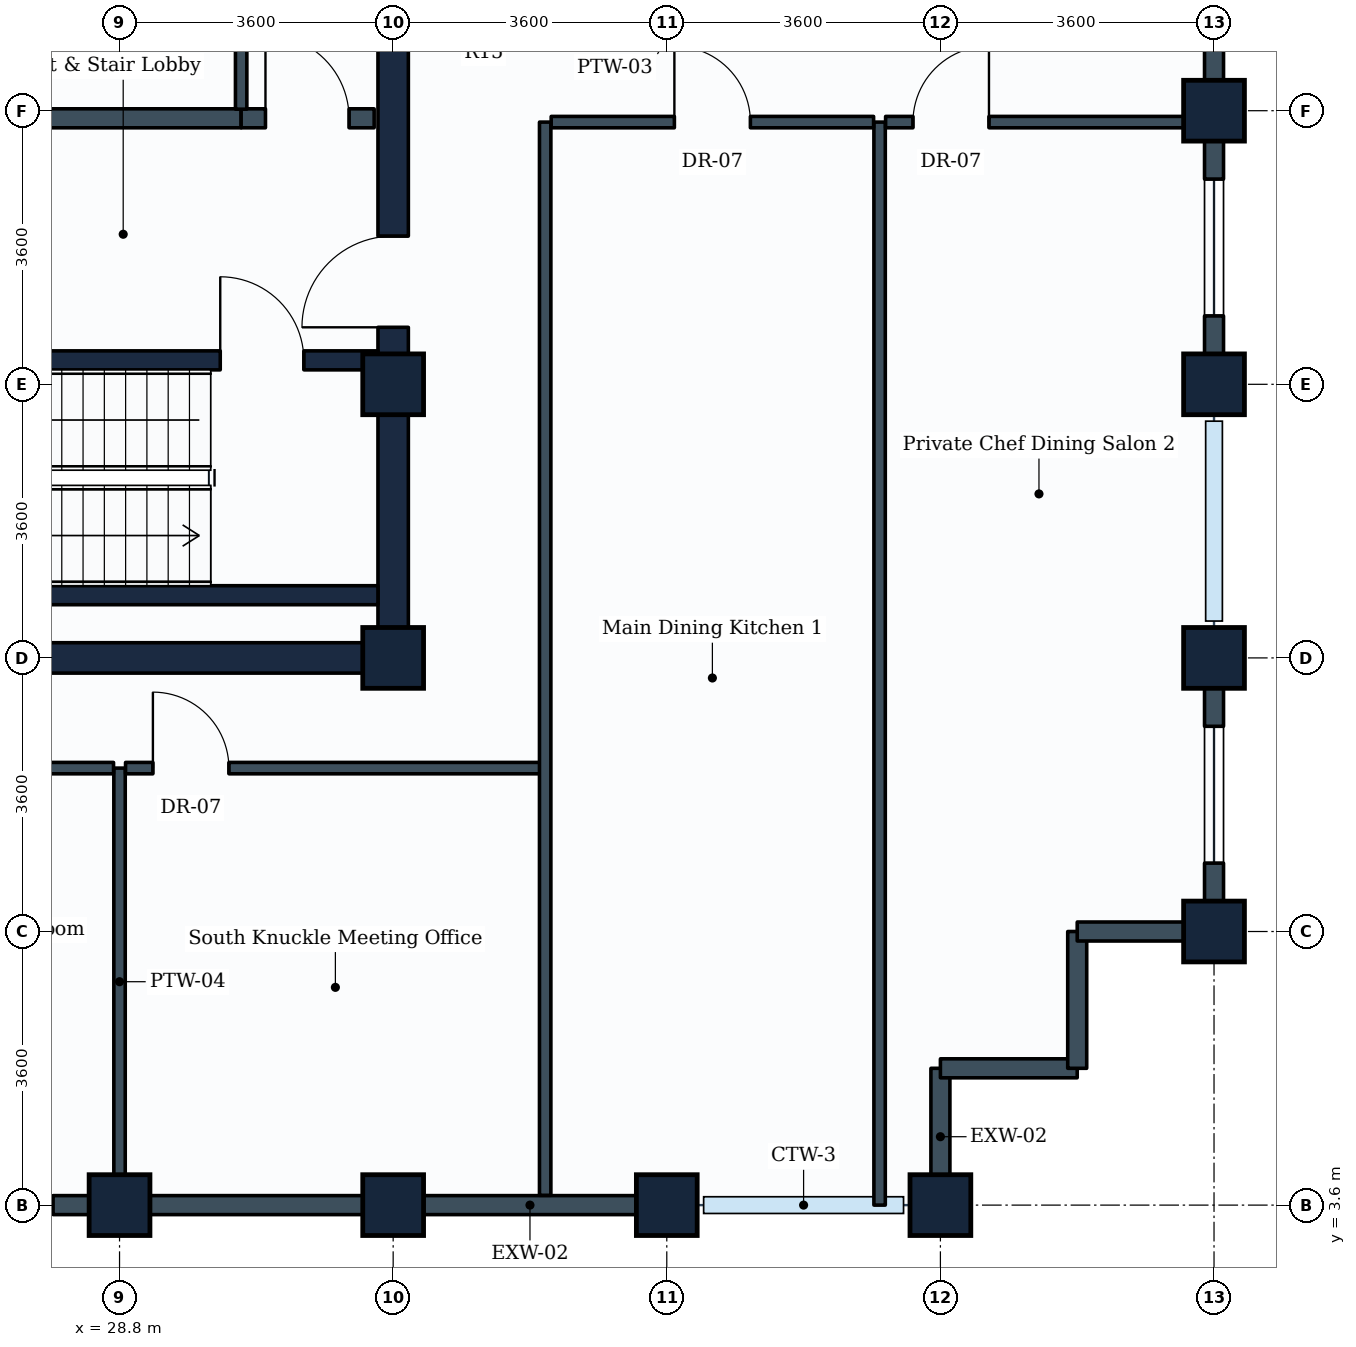
"""IFC4 building model, lengths in metres.
Left out: names, types, materials, properties, quantities, classifications, styles, units other than length and angle.
Written with IfcOpenShell. Run it as: python <this file> out.ifc"""

import sys

from ifc_helpers import new_model, si_unit, direction, frame, frame_2d, origin, origin_2d, place, context, subcontext, project, spatial, rectangle, extrude, element, fill, save


model = new_model("IFC4")
c1 = context("Model", 3, precision=1e-05, world=origin(), true_north=direction((0.0, 1.0)))
c2 = subcontext(c1, "Body", "Model", "MODEL_VIEW")
j1 = project(units=[si_unit("LENGTHUNIT", "METRE"), si_unit("PLANEANGLEUNIT", "RADIAN")], contexts=[c1])
p1 = place(None, origin())
s1 = spatial("IfcSite", under=j1, at=p1, CompositionType="ELEMENT")
p2 = place(p1, origin())
s2 = spatial("IfcBuilding", under=s1, at=p2, CompositionType="ELEMENT")
p3 = place(p2, frame((0.0, 0.0, 295.4)))
s3 = spatial("IfcBuildingStorey", under=s2, at=p3, CompositionType="ELEMENT", Elevation=295.4)
for number, where, z_axis, x_axis in (
    (1, (28.8, 3.6, 0.0), (0.0, 0.0, 1.0), (1.0, 0.0, 0.0)),
    (2, (32.4, 3.6, 0.0), (0.0, 0.0, 1.0), (1.0, 0.0, 0.0)),
    (3, (32.4, 10.8, 0.0), (0.0, 0.0, 1.0), (1.0, 0.0, 0.0)),
    (4, (32.4, 14.4, 0.0), (0.0, 0.0, 1.0), (1.0, 0.0, 0.0)),
    (5, (36.0, 3.6, 0.0), (0.0, 0.0, 1.0), (1.0, 0.0, 0.0)),
    (6, (39.6, 3.6, 0.0), (0.0, 0.0, 1.0), (1.0, 0.0, 0.0)),
    (7, (43.2, 7.2, 0.0), (0.0, 0.0, 1.0), (1.0, 0.0, 0.0)),
    (8, (43.2, 10.8, 0.0), (0.0, 0.0, 1.0), (0.0, 1.0, 0.0)),
    (9, (43.2, 14.4, 0.0), (0.0, 0.0, 1.0), (0.0, 1.0, 0.0)),
    (10, (43.2, 18.0, 0.0), (0.0, 0.0, 1.0), (0.0, 1.0, 0.0)),
):
    element("IfcColumn", number, at=place(p3, frame(where, z_axis=z_axis, x_axis=x_axis)), inside=s3, PredefinedType="COLUMN", context=c2, shape_type="SweptSolid", body=[
        extrude(rectangle(XDim=0.8, YDim=0.8, at=origin_2d()), origin(), (0.0, 0.0, 1.0), 4.4),
    ])
p4 = place(p3, frame((28.8, 3.6, 0.0), z_axis=(0.0, 0.0, 1.0), x_axis=(-1.0, 0.0, 0.0)))
e11 = element("IfcWall", 11, at=p4, inside=s3, PredefinedType="STANDARD", context=c2, shape_type="SweptSolid", body=[
    extrude(rectangle(XDim=3.6, YDim=0.25, at=frame_2d((1.8, 0.0))), origin(), (0.0, 0.0, 1.0), 3.63),
])
p5 = place(p4, frame((0.875, 0.0, 0.85)))
e12 = element("IfcOpeningElement", 12, at=p5, cuts=e11, PredefinedType="OPENING", context=c2, shape_type="SweptSolid", body=[
    extrude(rectangle(XDim=1.8, YDim=1.35, at=frame_2d((0.9, 0.675))), frame((0.0, 0.135, 0.0), z_axis=(0.0, -1.0, 0.0), x_axis=(1.0, 0.0, 0.0)), (0.0, 0.0, 1.0), 0.27),
])
p6 = place(p3, frame((32.4, 3.6, 0.0), z_axis=(0.0, 0.0, 1.0), x_axis=(-1.0, 0.0, 0.0)))
e13 = element("IfcWall", 13, at=p6, inside=s3, PredefinedType="STANDARD", context=c2, shape_type="SweptSolid", body=[
    extrude(rectangle(XDim=3.6, YDim=0.25, at=frame_2d((1.8, 0.0))), origin(), (0.0, 0.0, 1.0), 3.63),
])
p7 = place(p3, frame((36.0, 3.6, 0.0), z_axis=(0.0, 0.0, 1.0), x_axis=(-1.0, 0.0, 0.0)))
e14 = element("IfcWall", 14, at=p7, inside=s3, PredefinedType="STANDARD", context=c2, shape_type="SweptSolid", body=[
    extrude(rectangle(XDim=3.6, YDim=0.25, at=frame_2d((1.8, 0.0))), origin(), (0.0, 0.0, 1.0), 3.63),
])
p8 = place(p3, frame((39.6, 5.4, 0.0), z_axis=(0.0, 0.0, 1.0), x_axis=(0.0, -1.0, 0.0)))
e15 = element("IfcWall", 15, at=p8, inside=s3, PredefinedType="STANDARD", context=c2, shape_type="SweptSolid", body=[
    extrude(rectangle(XDim=1.8, YDim=0.25, at=frame_2d((0.9, 0.0))), origin(), (0.0, 0.0, 1.0), 3.63),
])
p9 = place(p3, frame((41.4, 5.4, 0.0), z_axis=(0.0, 0.0, 1.0), x_axis=(-1.0, 0.0, 0.0)))
e16 = element("IfcWall", 16, at=p9, inside=s3, PredefinedType="STANDARD", context=c2, shape_type="SweptSolid", body=[
    extrude(rectangle(XDim=1.8, YDim=0.25, at=frame_2d((0.9, 0.0))), origin(), (0.0, 0.0, 1.0), 4.135),
])
p10 = place(p3, frame((41.4, 7.2, 0.0), z_axis=(0.0, 0.0, 1.0), x_axis=(0.0, -1.0, 0.0)))
e17 = element("IfcWall", 17, at=p10, inside=s3, PredefinedType="STANDARD", context=c2, shape_type="SweptSolid", body=[
    extrude(rectangle(XDim=1.8, YDim=0.25, at=frame_2d((0.9, 0.0))), origin(), (0.0, 0.0, 1.0), 4.135),
])
p11 = place(p3, frame((43.2, 7.2, 0.0), z_axis=(0.0, 0.0, 1.0), x_axis=(-1.0, 0.0, 0.0)))
e18 = element("IfcWall", 18, at=p11, inside=s3, PredefinedType="STANDARD", context=c2, shape_type="SweptSolid", body=[
    extrude(rectangle(XDim=1.8, YDim=0.25, at=frame_2d((0.9, 0.0))), origin(), (0.0, 0.0, 1.0), 3.63),
])
p12 = place(p3, frame((43.2, 10.8, 0.0), z_axis=(0.0, 0.0, 1.0), x_axis=(0.0, -1.0, 0.0)))
e19 = element("IfcWall", 19, at=p12, inside=s3, PredefinedType="STANDARD", context=c2, shape_type="SweptSolid", body=[
    extrude(rectangle(XDim=3.6, YDim=0.25, at=frame_2d((1.8, 0.0))), origin(), (0.0, 0.0, 1.0), 3.63),
])
p13 = place(p12, frame((0.9, 0.0, 0.85)))
e20 = element("IfcOpeningElement", 20, at=p13, cuts=e19, PredefinedType="OPENING", context=c2, shape_type="SweptSolid", body=[
    extrude(rectangle(XDim=1.8, YDim=1.35, at=frame_2d((0.9, 0.675))), frame((0.0, 0.135, 0.0), z_axis=(0.0, -1.0, 0.0), x_axis=(1.0, 0.0, 0.0)), (0.0, 0.0, 1.0), 0.27),
])
p14 = place(p3, frame((43.2, 18.0, 0.0), z_axis=(0.0, 0.0, 1.0), x_axis=(0.0, -1.0, 0.0)))
e21 = element("IfcWall", 21, at=p14, inside=s3, PredefinedType="STANDARD", context=c2, shape_type="SweptSolid", body=[
    extrude(rectangle(XDim=3.6, YDim=0.25, at=frame_2d((1.8, 0.0))), origin(), (0.0, 0.0, 1.0), 3.63),
])
p15 = place(p14, frame((0.9, 0.0, 0.85)))
e22 = element("IfcOpeningElement", 22, at=p15, cuts=e21, PredefinedType="OPENING", context=c2, shape_type="SweptSolid", body=[
    extrude(rectangle(XDim=1.8, YDim=1.35, at=frame_2d((0.9, 0.675))), frame((0.0, 0.135, 0.0), z_axis=(0.0, -1.0, 0.0), x_axis=(1.0, 0.0, 0.0)), (0.0, 0.0, 1.0), 0.27),
])
p16 = place(p3, frame((43.2, 21.6, 0.0), z_axis=(0.0, 0.0, 1.0), x_axis=(0.0, -1.0, 0.0)))
e23 = element("IfcWall", 23, at=p16, inside=s3, PredefinedType="STANDARD", context=c2, shape_type="SweptSolid", body=[
    extrude(rectangle(XDim=3.6, YDim=0.25, at=frame_2d((1.8, 0.0))), origin(), (0.0, 0.0, 1.0), 3.63),
])
p17 = place(p3, frame((14.4, 10.8, 0.0), z_axis=(0.0, 0.0, 1.0), x_axis=(1.0, 0.0, 0.0)))
e24 = element("IfcWall", 24, at=p17, inside=s3, PredefinedType="SHEAR", context=c2, shape_type="SweptSolid", body=[
    extrude(rectangle(XDim=18.0, YDim=0.4, at=frame_2d((9.0, 0.0))), origin(), (0.0, 0.0, 1.0), 4.15),
])
p18 = place(p3, frame((32.4, 10.8, 0.0), z_axis=(0.0, 0.0, 1.0), x_axis=(0.0, 1.0, 0.0)))
e25 = element("IfcWall", 25, at=p18, inside=s3, PredefinedType="SHEAR", context=c2, shape_type="SweptSolid", body=[
    extrude(rectangle(XDim=14.4, YDim=0.4, at=frame_2d((7.2, 0.0))), origin(), (0.0, 0.0, 1.0), 4.15),
])
p19 = place(p18, frame((4.35, 0.0, 0.0)))
e26 = element("IfcOpeningElement", 26, at=p19, cuts=e25, PredefinedType="OPENING", context=c2, shape_type="SweptSolid", body=[
    extrude(rectangle(XDim=1.2, YDim=2.1, at=frame_2d((0.6, 1.05))), frame((0.0, 0.21, 0.0), z_axis=(0.0, -1.0, 0.0), x_axis=(1.0, 0.0, 0.0)), (0.0, 0.0, 1.0), 0.42),
])
p20 = place(p18, frame((10.0, 0.0, 0.0)))
e27 = element("IfcOpeningElement", 27, at=p20, cuts=e25, PredefinedType="OPENING", context=c2, shape_type="SweptSolid", body=[
    extrude(rectangle(XDim=1.2, YDim=2.1, at=frame_2d((0.6, 1.05))), frame((0.0, 0.21, 0.0), z_axis=(0.0, -1.0, 0.0), x_axis=(1.0, 0.0, 0.0)), (0.0, 0.0, 1.0), 0.42),
])
p21 = place(p3, frame((23.35, 11.625, 0.0), z_axis=(0.0, 0.0, 1.0), x_axis=(1.0, 0.0, 0.0)))
e28 = element("IfcWall", 28, at=p21, inside=s3, PredefinedType="SHEAR", context=c2, shape_type="SweptSolid", body=[
    extrude(rectangle(XDim=8.85, YDim=0.25, at=frame_2d((4.425, 0.0))), origin(), (0.0, 0.0, 1.0), 4.15),
])
p22 = place(p3, frame((23.35, 14.715, 0.0), z_axis=(0.0, 0.0, 1.0), x_axis=(1.0, 0.0, 0.0)))
e29 = element("IfcWall", 29, at=p22, inside=s3, PredefinedType="SHEAR", context=c2, shape_type="SweptSolid", body=[
    extrude(rectangle(XDim=8.85, YDim=0.25, at=frame_2d((4.425, 0.0))), origin(), (0.0, 0.0, 1.0), 4.15),
])
p23 = place(p22, frame((6.775, 0.0, 0.0)))
e30 = element("IfcOpeningElement", 30, at=p23, cuts=e29, PredefinedType="OPENING", context=c2, shape_type="SweptSolid", body=[
    extrude(rectangle(XDim=1.1, YDim=2.1, at=frame_2d((0.55, 1.05))), frame((0.0, 0.135, 0.0), z_axis=(0.0, -1.0, 0.0), x_axis=(1.0, 0.0, 0.0)), (0.0, 0.0, 1.0), 0.27),
])
p24 = place(p3, frame((21.88, 17.9, 0.0), z_axis=(0.0, 0.0, 1.0), x_axis=(1.0, 0.0, 0.0)))
e31 = element("IfcWall", 31, at=p24, inside=s3, PredefinedType="PARTITIONING", context=c2, shape_type="SweptSolid", body=[
    extrude(rectangle(XDim=8.52, YDim=0.25, at=frame_2d((4.26, 0.0))), origin(), (0.0, 0.0, 1.0), 4.135),
])
p25 = place(p3, frame((30.4, 17.9, 0.0), z_axis=(0.0, 0.0, 1.0), x_axis=(1.0, 0.0, 0.0)))
e32 = element("IfcWall", 32, at=p25, inside=s3, PredefinedType="PARTITIONING", context=c2, shape_type="SweptSolid", body=[
    extrude(rectangle(XDim=1.75, YDim=0.25, at=frame_2d((0.875, 0.0))), origin(), (0.0, 0.0, 1.0), 4.135),
])
p26 = place(p25, frame((0.32, 0.0, 0.0)))
e33 = element("IfcOpeningElement", 33, at=p26, cuts=e32, PredefinedType="OPENING", context=c2, shape_type="SweptSolid", body=[
    extrude(rectangle(XDim=1.1, YDim=2.1, at=frame_2d((0.55, 1.05))), frame((0.0, 0.135, 0.0), z_axis=(0.0, -1.0, 0.0), x_axis=(1.0, 0.0, 0.0)), (0.0, 0.0, 1.0), 0.27),
])
p27 = place(p3, frame((30.4, 18.02, 0.0), z_axis=(0.0, 0.0, 1.0), x_axis=(0.0, 1.0, 0.0)))
e34 = element("IfcWall", 34, at=p27, inside=s3, PredefinedType="PARTITIONING", context=c2, shape_type="SweptSolid", body=[
    extrude(rectangle(XDim=3.2, YDim=0.15, at=frame_2d((1.6, 0.0))), origin(), (0.0, 0.0, 1.0), 4.135),
])
p28 = place(p3, frame((28.8, 9.35, 0.0), z_axis=(0.0, 0.0, 1.0), x_axis=(0.0, -1.0, 0.0)))
e35 = element("IfcWall", 35, at=p28, inside=s3, PredefinedType="PARTITIONING", context=c2, shape_type="SweptSolid", body=[
    extrude(rectangle(XDim=5.621, YDim=0.15, at=frame_2d((2.811, 0.0))), origin(), (0.0, 0.0, 1.0), 4.135),
])
p29 = place(p3, frame((13.08, 9.35, 0.0), z_axis=(0.0, 0.0, 1.0), x_axis=(1.0, 0.0, 0.0)))
e36 = element("IfcWall", 36, at=p29, inside=s3, PredefinedType="PARTITIONING", context=c2, shape_type="SweptSolid", body=[
    extrude(rectangle(XDim=15.641, YDim=0.15, at=frame_2d((7.82, 0.0))), origin(), (0.0, 0.0, 1.0), 3.82),
])
p30 = place(p3, frame((28.879, 9.35, 0.0), z_axis=(0.0, 0.0, 1.0), x_axis=(1.0, 0.0, 0.0)))
e37 = element("IfcWall", 37, at=p30, inside=s3, PredefinedType="PARTITIONING", context=c2, shape_type="SweptSolid", body=[
    extrude(rectangle(XDim=5.521, YDim=0.15, at=frame_2d((2.76, 0.0))), origin(), (0.0, 0.0, 1.0), 4.135),
])
p31 = place(p30, frame((0.36, 0.0, 0.0)))
e38 = element("IfcOpeningElement", 38, at=p31, cuts=e37, PredefinedType="OPENING", context=c2, shape_type="SweptSolid", body=[
    extrude(rectangle(XDim=1.0, YDim=2.1, at=frame_2d((0.5, 1.05))), frame((0.0, 0.085, 0.0), z_axis=(0.0, -1.0, 0.0), x_axis=(1.0, 0.0, 0.0)), (0.0, 0.0, 1.0), 0.17),
])
p32 = place(p3, frame((34.4, 3.729, 0.0), z_axis=(0.0, 0.0, 1.0), x_axis=(0.0, 1.0, 0.0)))
e39 = element("IfcWall", 39, at=p32, inside=s3, PredefinedType="PARTITIONING", context=c2, shape_type="SweptSolid", body=[
    extrude(rectangle(XDim=14.121, YDim=0.15, at=frame_2d((7.061, 0.0))), origin(), (0.0, 0.0, 1.0), 3.63),
])
p33 = place(p3, frame((38.8, 3.6, 0.0), z_axis=(0.0, 0.0, 1.0), x_axis=(0.0, 1.0, 0.0)))
e40 = element("IfcWall", 40, at=p33, inside=s3, PredefinedType="PARTITIONING", context=c2, shape_type="SweptSolid", body=[
    extrude(rectangle(XDim=14.25, YDim=0.15, at=frame_2d((7.125, 0.0))), origin(), (0.0, 0.0, 1.0), 3.63),
])
p34 = place(p3, frame((34.479, 17.85, 0.0), z_axis=(0.0, 0.0, 1.0), x_axis=(1.0, 0.0, 0.0)))
e41 = element("IfcWall", 41, at=p34, inside=s3, PredefinedType="PARTITIONING", context=c2, shape_type="SweptSolid", body=[
    extrude(rectangle(XDim=4.242, YDim=0.15, at=frame_2d((2.121, 0.0))), origin(), (0.0, 0.0, 1.0), 3.82),
])
p35 = place(p34, frame((1.621, 0.0, 0.0)))
e42 = element("IfcOpeningElement", 42, at=p35, cuts=e41, PredefinedType="OPENING", context=c2, shape_type="SweptSolid", body=[
    extrude(rectangle(XDim=1.0, YDim=2.1, at=frame_2d((0.5, 1.05))), frame((0.0, 0.085, 0.0), z_axis=(0.0, -1.0, 0.0), x_axis=(1.0, 0.0, 0.0)), (0.0, 0.0, 1.0), 0.17),
])
p36 = place(p3, frame((38.879, 17.85, 0.0), z_axis=(0.0, 0.0, 1.0), x_axis=(1.0, 0.0, 0.0)))
e43 = element("IfcWall", 43, at=p36, inside=s3, PredefinedType="PARTITIONING", context=c2, shape_type="SweptSolid", body=[
    extrude(rectangle(XDim=4.192, YDim=0.15, at=frame_2d((2.096, 0.0))), origin(), (0.0, 0.0, 1.0), 3.63),
])
p37 = place(p36, frame((0.36, 0.0, 0.0)))
e44 = element("IfcOpeningElement", 44, at=p37, cuts=e43, PredefinedType="OPENING", context=c2, shape_type="SweptSolid", body=[
    extrude(rectangle(XDim=1.0, YDim=2.1, at=frame_2d((0.5, 1.05))), frame((0.0, 0.085, 0.0), z_axis=(0.0, -1.0, 0.0), x_axis=(1.0, 0.0, 0.0)), (0.0, 0.0, 1.0), 0.17),
])
p38 = place(p5, origin())
e45 = element("IfcWindow", 45, at=p38, inside=s3, PartitioningType="SINGLE_PANEL", PredefinedType="WINDOW", context=c2, shape_type="SweptSolid", body=[
    extrude(rectangle(XDim=1.8, YDim=1.35, at=frame_2d((0.9, 0.675))), frame((0.0, 0.03, 0.0), z_axis=(0.0, -1.0, 0.0), x_axis=(1.0, 0.0, 0.0)), (0.0, 0.0, 1.0), 0.06),
])
fill(e12, e45)
p39 = place(p13, origin())
e46 = element("IfcWindow", 46, at=p39, inside=s3, PartitioningType="SINGLE_PANEL", PredefinedType="WINDOW", context=c2, shape_type="SweptSolid", body=[
    extrude(rectangle(XDim=1.8, YDim=1.35, at=frame_2d((0.9, 0.675))), frame((0.0, 0.03, 0.0), z_axis=(0.0, -1.0, 0.0), x_axis=(1.0, 0.0, 0.0)), (0.0, 0.0, 1.0), 0.06),
])
fill(e20, e46)
p40 = place(p15, origin())
e47 = element("IfcWindow", 47, at=p40, inside=s3, PartitioningType="SINGLE_PANEL", PredefinedType="WINDOW", context=c2, shape_type="SweptSolid", body=[
    extrude(rectangle(XDim=1.8, YDim=1.35, at=frame_2d((0.9, 0.675))), frame((0.0, 0.03, 0.0), z_axis=(0.0, -1.0, 0.0), x_axis=(1.0, 0.0, 0.0)), (0.0, 0.0, 1.0), 0.06),
])
fill(e22, e47)
p41 = place(p23, origin())
e48 = element("IfcDoor", 48, at=p41, inside=s3, OperationType="SINGLE_SWING_LEFT", PredefinedType="DOOR", context=c2, shape_type="SweptSolid", body=[
    extrude(rectangle(XDim=1.1, YDim=2.1, at=frame_2d((0.55, 1.05))), frame((0.0, 0.025, 0.0), z_axis=(0.0, -1.0, 0.0), x_axis=(1.0, 0.0, 0.0)), (0.0, 0.0, 1.0), 0.05),
])
fill(e30, e48)
p42 = place(p19, origin())
e49 = element("IfcDoor", 49, at=p42, inside=s3, OperationType="SINGLE_SWING_LEFT", PredefinedType="DOOR", context=c2, shape_type="SweptSolid", body=[
    extrude(rectangle(XDim=1.2, YDim=2.1, at=frame_2d((0.6, 1.05))), frame((0.0, 0.025, 0.0), z_axis=(0.0, -1.0, 0.0), x_axis=(1.0, 0.0, 0.0)), (0.0, 0.0, 1.0), 0.05),
])
fill(e26, e49)
p43 = place(p26, origin())
e50 = element("IfcDoor", 50, at=p43, inside=s3, OperationType="SINGLE_SWING_LEFT", PredefinedType="DOOR", context=c2, shape_type="SweptSolid", body=[
    extrude(rectangle(XDim=1.1, YDim=2.1, at=frame_2d((0.55, 1.05))), frame((0.0, 0.025, 0.0), z_axis=(0.0, -1.0, 0.0), x_axis=(1.0, 0.0, 0.0)), (0.0, 0.0, 1.0), 0.05),
])
fill(e33, e50)
p44 = place(p31, origin())
e51 = element("IfcDoor", 51, at=p44, inside=s3, OperationType="SINGLE_SWING_LEFT", PredefinedType="DOOR", context=c2, shape_type="SweptSolid", body=[
    extrude(rectangle(XDim=1.0, YDim=2.1, at=frame_2d((0.5, 1.05))), frame((0.0, 0.025, 0.0), z_axis=(0.0, -1.0, 0.0), x_axis=(1.0, 0.0, 0.0)), (0.0, 0.0, 1.0), 0.05),
])
fill(e38, e51)
p45 = place(p35, origin())
e52 = element("IfcDoor", 52, at=p45, inside=s3, OperationType="SINGLE_SWING_LEFT", PredefinedType="DOOR", context=c2, shape_type="SweptSolid", body=[
    extrude(rectangle(XDim=1.0, YDim=2.1, at=frame_2d((0.5, 1.05))), frame((0.0, 0.025, 0.0), z_axis=(0.0, -1.0, 0.0), x_axis=(1.0, 0.0, 0.0)), (0.0, 0.0, 1.0), 0.05),
])
fill(e42, e52)
p46 = place(p37, origin())
e53 = element("IfcDoor", 53, at=p46, inside=s3, OperationType="SINGLE_SWING_RIGHT", PredefinedType="DOOR", context=c2, shape_type="SweptSolid", body=[
    extrude(rectangle(XDim=1.0, YDim=2.1, at=frame_2d((0.5, 1.05))), frame((0.0, 0.025, 0.0), z_axis=(0.0, -1.0, 0.0), x_axis=(1.0, 0.0, 0.0)), (0.0, 0.0, 1.0), 0.05),
])
fill(e44, e53)
save(model, sys.argv[1])
